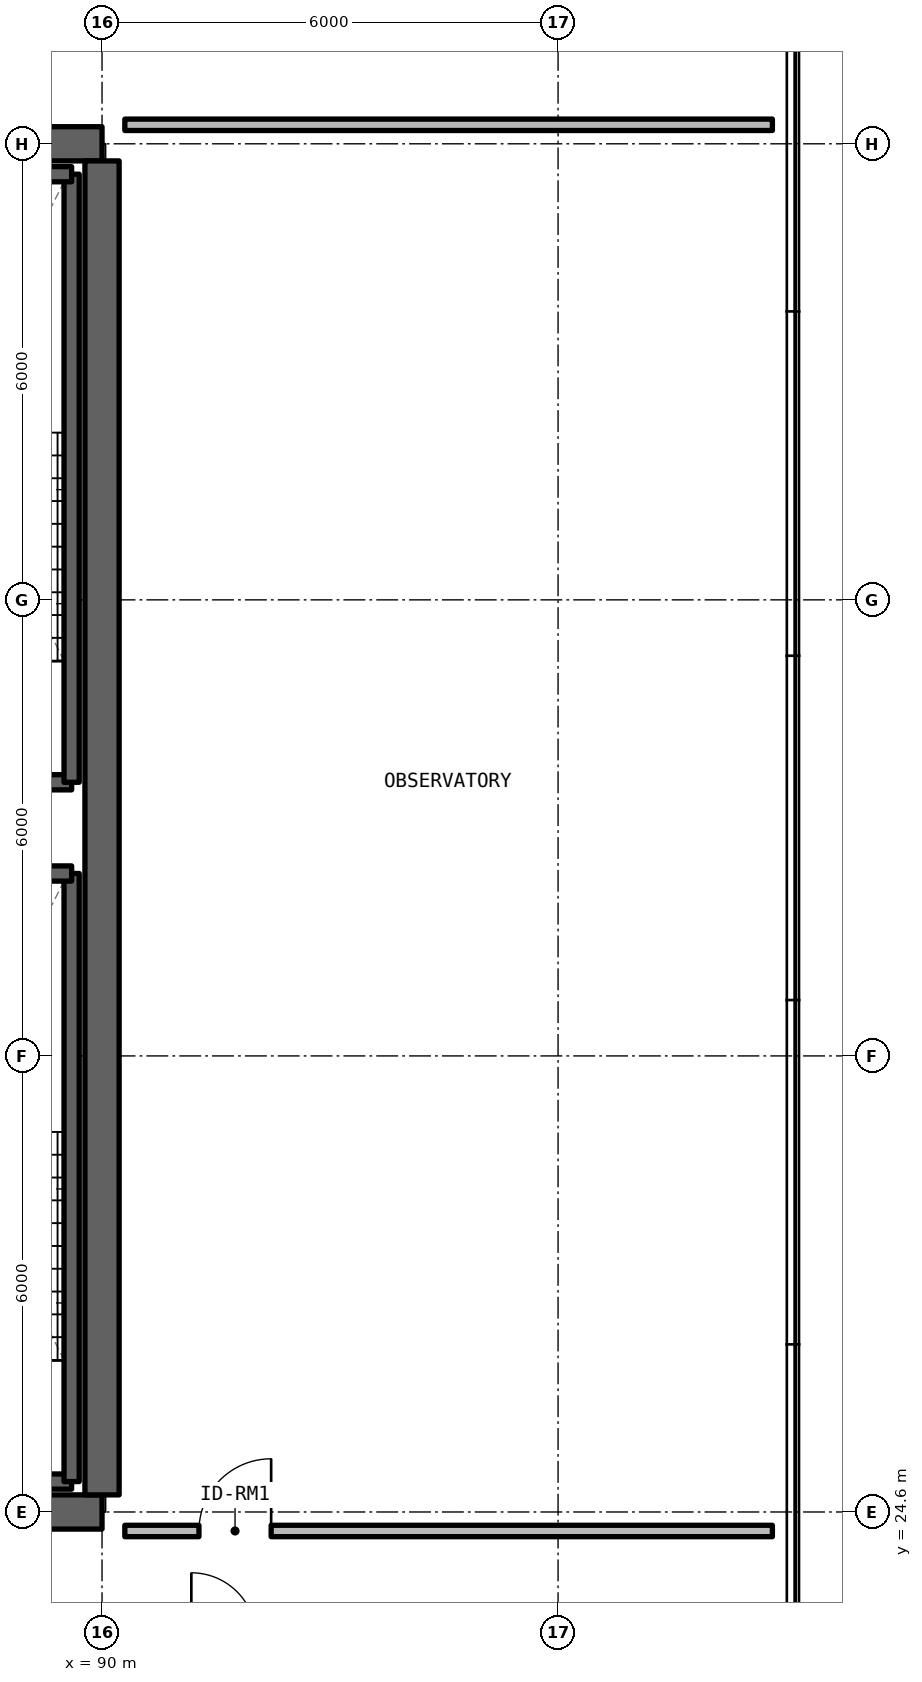
"""IFC4 building model, lengths in metres.
Left out: names, types, materials, properties, quantities, classifications, styles, units other than length and angle.
Written with IfcOpenShell. Run it as: python <this file> out.ifc"""

import sys

from ifc_helpers import new_model, si_unit, direction, frame, frame_2d, origin, place, context, subcontext, project, spatial, rectangle, extrude, element, fill, save


model = new_model("IFC4")
c1 = context("Model", 3, precision=1e-05, world=origin(), true_north=direction((0.0, 1.0)))
c2 = subcontext(c1, "Body", "Model", "MODEL_VIEW")
j1 = project(units=[si_unit("LENGTHUNIT", "METRE"), si_unit("PLANEANGLEUNIT", "RADIAN")], contexts=[c1])
p1 = place(None, origin())
s1 = spatial("IfcSite", under=j1, at=p1, CompositionType="ELEMENT")
p2 = place(p1, origin())
s2 = spatial("IfcBuilding", under=s1, at=p2, CompositionType="ELEMENT")
p3 = place(p2, frame((0.0, 0.0, 267.96)))
s3 = spatial("IfcBuildingStorey", under=s2, at=p3, CompositionType="ELEMENT", Elevation=267.96)
for number, where, z_axis, x_axis in (
    (1, (78.0, 24.6, 0.0), (0.0, 0.0, 1.0), (1.0, 0.0, 0.0)),
    (2, (90.0, 42.6, 0.0), (0.0, 0.0, 1.0), (-1.0, 0.0, 0.0)),
):
    element("IfcWall", number, at=place(p3, frame(where, z_axis=z_axis, x_axis=x_axis)), inside=s3, PredefinedType="SHEAR", context=c2, shape_type="SweptSolid", body=[
        extrude(rectangle(XDim=12.0, YDim=0.45, at=frame_2d((6.0, 0.0))), origin(), (0.0, 0.0, 1.0), 3.63),
    ])
p4 = place(p3, frame((90.0, 24.825, 0.0), z_axis=(0.0, 0.0, 1.0), x_axis=(0.0, 1.0, 0.0)))
e3 = element("IfcWall", 3, at=p4, inside=s3, PredefinedType="SHEAR", context=c2, shape_type="SweptSolid", body=[
    extrude(rectangle(XDim=17.55, YDim=0.45, at=frame_2d((8.775, 0.0))), origin(), (0.0, 0.0, 1.0), 3.63),
])
p5 = place(p3, frame((90.3, 24.35, 0.0), z_axis=(0.0, 0.0, 1.0), x_axis=(1.0, 0.0, 0.0)))
e4 = element("IfcWall", 4, at=p5, inside=s3, PredefinedType="SOLIDWALL", context=c2, shape_type="SweptSolid", body=[
    extrude(rectangle(XDim=8.52, YDim=0.15, at=frame_2d((4.26, 0.0))), origin(), (0.0, 0.0, 1.0), 2.63),
])
p6 = place(p5, frame((0.975, 0.0, 0.0)))
e5 = element("IfcOpeningElement", 5, at=p6, cuts=e4, PredefinedType="OPENING", context=c2, shape_type="SweptSolid", body=[
    extrude(rectangle(XDim=0.95, YDim=2.15, at=frame_2d((0.475, 1.075))), frame((0.0, 0.085, 0.0), z_axis=(0.0, -1.0, 0.0), x_axis=(1.0, 0.0, 0.0)), (0.0, 0.0, 1.0), 0.17),
])
p7 = place(p3, frame((90.3, 42.85, 0.0), z_axis=(0.0, 0.0, 1.0), x_axis=(1.0, 0.0, 0.0)))
e6 = element("IfcWall", 6, at=p7, inside=s3, PredefinedType="SOLIDWALL", context=c2, shape_type="SweptSolid", body=[
    extrude(rectangle(XDim=8.52, YDim=0.15, at=frame_2d((4.26, 0.0))), origin(), (0.0, 0.0, 1.0), 2.63),
])
p8 = place(p3, frame((86.2, 25.0, 0.0), z_axis=(0.0, 0.0, 1.0), x_axis=(1.0, 0.0, 0.0)))
e7 = element("IfcWall", 7, at=p8, inside=s3, PredefinedType="SOLIDWALL", context=c2, shape_type="SweptSolid", body=[
    extrude(rectangle(XDim=3.4, YDim=0.2, at=frame_2d((1.7, 0.0))), origin(), (0.0, 0.0, 1.0), 3.63),
])
p9 = place(p3, frame((89.6, 25.0, 0.0), z_axis=(0.0, 0.0, 1.0), x_axis=(0.0, 1.0, 0.0)))
e8 = element("IfcWall", 8, at=p9, inside=s3, PredefinedType="SOLIDWALL", context=c2, shape_type="SweptSolid", body=[
    extrude(rectangle(XDim=8.0, YDim=0.2, at=frame_2d((4.0, 0.0))), origin(), (0.0, 0.0, 1.0), 3.63),
])
for number, where, z_axis, x_axis in (
    (9, (89.6, 33.0, 0.0), (0.0, 0.0, 1.0), (-1.0, 0.0, 0.0)),
    (10, (86.2, 34.2, 0.0), (0.0, 0.0, 1.0), (1.0, 0.0, 0.0)),
):
    element("IfcWall", number, at=place(p3, frame(where, z_axis=z_axis, x_axis=x_axis)), inside=s3, PredefinedType="SOLIDWALL", context=c2, shape_type="SweptSolid", body=[
        extrude(rectangle(XDim=3.4, YDim=0.2, at=frame_2d((1.7, 0.0))), origin(), (0.0, 0.0, 1.0), 3.63),
    ])
p10 = place(p3, frame((89.6, 34.2, 0.0), z_axis=(0.0, 0.0, 1.0), x_axis=(0.0, 1.0, 0.0)))
e11 = element("IfcWall", 11, at=p10, inside=s3, PredefinedType="SOLIDWALL", context=c2, shape_type="SweptSolid", body=[
    extrude(rectangle(XDim=8.0, YDim=0.2, at=frame_2d((4.0, 0.0))), origin(), (0.0, 0.0, 1.0), 3.63),
])
p11 = place(p3, frame((89.6, 42.2, 0.0), z_axis=(0.0, 0.0, 1.0), x_axis=(-1.0, 0.0, 0.0)))
e12 = element("IfcWall", 12, at=p11, inside=s3, PredefinedType="SOLIDWALL", context=c2, shape_type="SweptSolid", body=[
    extrude(rectangle(XDim=3.4, YDim=0.2, at=frame_2d((1.7, 0.0))), origin(), (0.0, 0.0, 1.0), 3.63),
])
p12 = place(p6, origin())
e13 = element("IfcDoor", 13, at=p12, inside=s3, OperationType="SINGLE_SWING_RIGHT", PredefinedType="DOOR", context=c2, shape_type="SweptSolid", body=[
    extrude(rectangle(XDim=0.95, YDim=2.15, at=frame_2d((0.475, 1.075))), frame((0.0, 0.025, 0.0), z_axis=(0.0, -1.0, 0.0), x_axis=(1.0, 0.0, 0.0)), (0.0, 0.0, 1.0), 0.05),
])
fill(e5, e13)
save(model, sys.argv[1])
